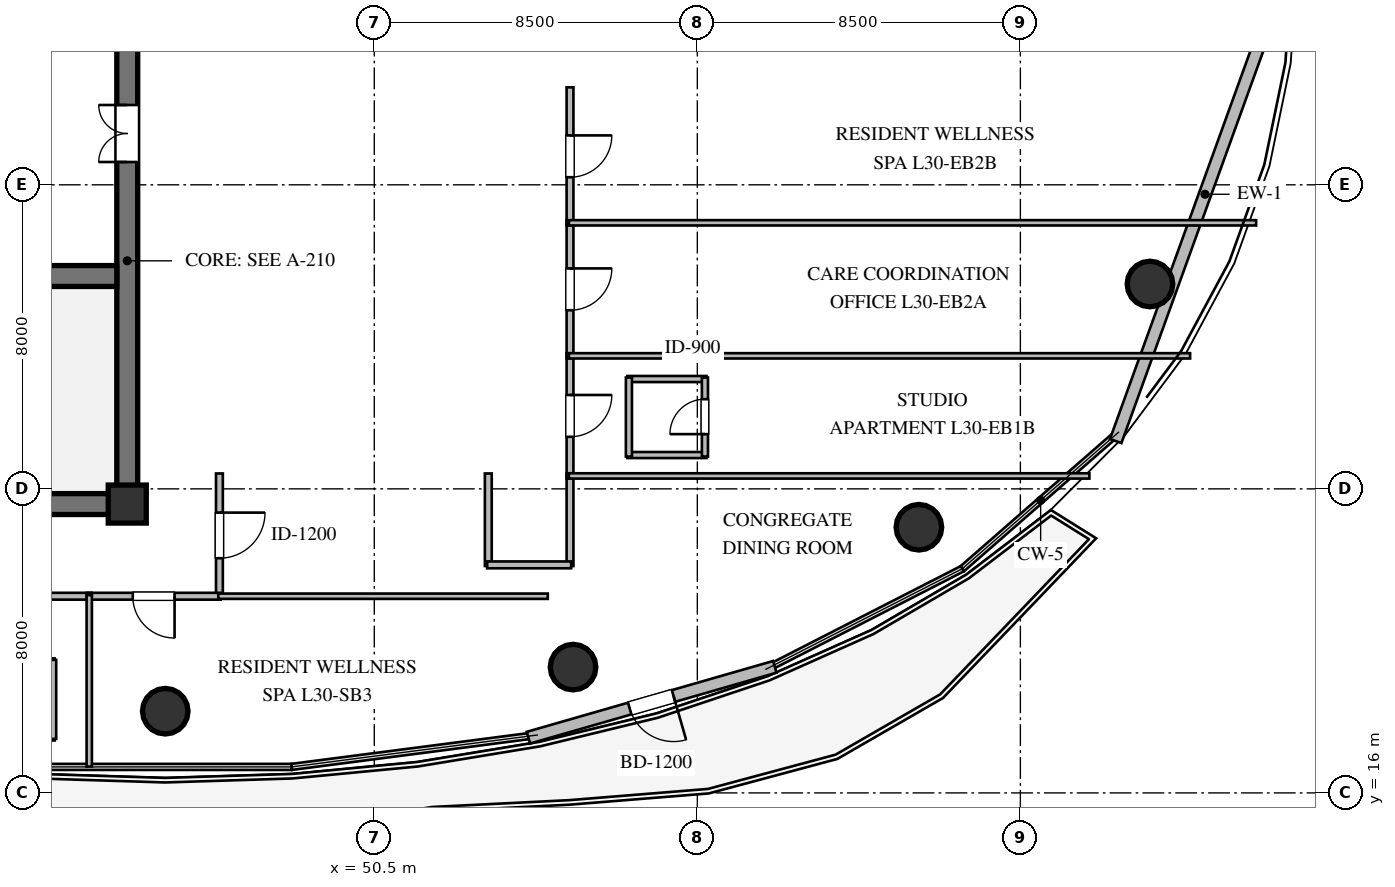
"""IFC4 building model, lengths in metres.
Left out: names, types, materials, properties, quantities, classifications, styles, units other than length and angle.
Written with IfcOpenShell. Run it as: python <this file> out.ifc"""

import sys

from ifc_helpers import new_model, si_unit, direction, frame, frame_2d, origin, origin_2d, place, context, subcontext, project, spatial, rectangle, circle, extrude, element, fill, save


model = new_model("IFC4")
c1 = context("Model", 3, precision=1e-05, world=origin(), true_north=direction((0.0, 1.0)))
c2 = subcontext(c1, "Body", "Model", "MODEL_VIEW")
j1 = project(units=[si_unit("LENGTHUNIT", "METRE"), si_unit("PLANEANGLEUNIT", "RADIAN")], contexts=[c1])
p1 = place(None, origin())
s1 = spatial("IfcSite", under=j1, at=p1, CompositionType="ELEMENT")
p2 = place(p1, origin())
s2 = spatial("IfcBuilding", under=s1, at=p2, CompositionType="ELEMENT")
p3 = place(p2, frame((0.0, 0.0, 117.0)))
s3 = spatial("IfcBuildingStorey", under=s2, at=p3, CompositionType="ELEMENT", Elevation=117.0)
p4 = place(p3, frame((21.725, 23.6, 0.0), z_axis=(0.0, 0.0, 1.0), x_axis=(1.0, 0.0, 0.0)))
e1 = element("IfcWall", 1, at=p4, inside=s3, PredefinedType="SHEAR", context=c2, shape_type="SweptSolid", body=[
    extrude(rectangle(XDim=22.55, YDim=0.55, at=frame_2d((11.275, 0.0))), origin(), (0.0, 0.0, 1.0), 3.36),
])
p5 = place(p3, frame((44.0, 23.875, 0.0), z_axis=(0.0, 0.0, 1.0), x_axis=(0.0, 1.0, 0.0)))
e2 = element("IfcWall", 2, at=p5, inside=s3, PredefinedType="SHEAR", context=c2, shape_type="SweptSolid", body=[
    extrude(rectangle(XDim=12.25, YDim=0.55, at=frame_2d((6.125, 0.0))), origin(), (0.0, 0.0, 1.0), 3.36),
])
p6 = place(p5, frame((8.725, 0.0, 0.0)))
e3 = element("IfcOpeningElement", 3, at=p6, cuts=e2, PredefinedType="OPENING", context=c2, shape_type="SweptSolid", body=[
    extrude(rectangle(XDim=1.5, YDim=2.15, at=frame_2d((0.75, 1.075))), frame((0.0, 0.285, 0.0), z_axis=(0.0, -1.0, 0.0), x_axis=(1.0, 0.0, 0.0)), (0.0, 0.0, 1.0), 0.57),
])
p7 = place(p3, frame((22.275, 29.6, 0.0), z_axis=(0.0, 0.0, 1.0), x_axis=(1.0, 0.0, 0.0)))
e4 = element("IfcWall", 4, at=p7, inside=s3, PredefinedType="SHEAR", context=c2, shape_type="SweptSolid", body=[
    extrude(rectangle(XDim=21.45, YDim=0.55, at=frame_2d((10.725, 0.0))), origin(), (0.0, 0.0, 1.0), 3.36),
])
p8 = place(p7, frame((12.175, 0.0, 0.0)))
e5 = element("IfcOpeningElement", 5, at=p8, cuts=e4, PredefinedType="OPENING", context=c2, shape_type="SweptSolid", body=[
    extrude(rectangle(XDim=1.15, YDim=2.1, at=frame_2d((0.575, 1.05))), frame((0.0, 0.285, 0.0), z_axis=(0.0, -1.0, 0.0), x_axis=(1.0, 0.0, 0.0)), (0.0, 0.0, 1.0), 0.57),
])
p9 = place(p3, frame((44.0, 23.6, 0.0), z_axis=(0.0, 0.0, 1.0), x_axis=(1.0, 0.0, 0.0)))
e6 = element("IfcColumn", 6, at=p9, inside=s3, PredefinedType="COLUMN", context=c2, shape_type="SweptSolid", body=[
    extrude(rectangle(XDim=1.0, YDim=1.0, at=origin_2d()), origin(), (0.0, 0.0, 1.0), 3.6),
])
for number, where, z_axis, x_axis in (
    (7, (45.0, 18.15, 0.0), (0.0, 0.0, 1.0), (1.0, 0.0, 0.0)),
    (8, (55.73, 19.31, 0.0), (0.0, 0.0, 1.0), (1.0, 0.0, 0.0)),
    (9, (64.83, 22.99, 0.0), (0.0, 0.0, 1.0), (1.0, 0.0, 0.0)),
    (10, (70.91, 29.39, 0.0), (0.0, 0.0, 1.0), (1.0, 0.0, 0.0)),
):
    element("IfcColumn", number, at=place(p3, frame(where, z_axis=z_axis, x_axis=x_axis)), inside=s3, PredefinedType="COLUMN", context=c2, shape_type="SweptSolid", body=[
        extrude(circle(Radius=0.6, at=origin_2d()), origin(), (0.0, 0.0, 1.0), 3.6),
    ])
p10 = place(p3, frame((74.708, 38.244, 0.0), z_axis=(0.0, 0.0, 1.0), x_axis=(-0.340324669139, -0.94030799187, 0.0)))
e11 = element("IfcWall", 11, at=p10, inside=s3, PredefinedType="STANDARD", context=c2, shape_type="SweptSolid", body=[
    extrude(rectangle(XDim=13.81, YDim=0.32, at=frame_2d((6.905, 0.0))), origin(), (0.0, 0.0, 1.0), 3.36),
])
p11 = place(p3, frame((61.039, 19.317, 0.0), z_axis=(0.0, 0.0, 1.0), x_axis=(-0.96106509915, -0.276322049784, 0.0)))
e12 = element("IfcWall", 12, at=p11, inside=s3, PredefinedType="STANDARD", context=c2, shape_type="SweptSolid", body=[
    extrude(rectangle(XDim=6.746, YDim=0.32, at=frame_2d((3.373, 0.0))), origin(), (0.0, 0.0, 1.0), 3.36),
])
p12 = place(p11, frame((2.773, 0.0, 0.0)))
e13 = element("IfcOpeningElement", 13, at=p12, cuts=e12, PredefinedType="OPENING", context=c2, shape_type="SweptSolid", body=[
    extrude(rectangle(XDim=1.2, YDim=2.15, at=frame_2d((0.6, 1.075))), frame((0.0, 0.17, 0.0), z_axis=(0.0, -1.0, 0.0), x_axis=(1.0, 0.0, 0.0)), (0.0, 0.0, 1.0), 0.34),
])
p13 = place(p3, frame((57.16, 24.89, 0.0), z_axis=(0.0, 0.0, 1.0), x_axis=(1.0, 0.0, 0.0)))
e14 = element("IfcWall", 14, at=p13, inside=s3, PredefinedType="PLUMBINGWALL", context=c2, shape_type="SweptSolid", body=[
    extrude(rectangle(XDim=2.08, YDim=0.16, at=frame_2d((1.04, 0.0))), origin(), (0.0, 0.0, 1.0), 3.36),
])
p14 = place(p3, frame((57.16, 26.89, 0.0), z_axis=(0.0, 0.0, 1.0), x_axis=(1.0, 0.0, 0.0)))
e15 = element("IfcWall", 15, at=p14, inside=s3, PredefinedType="PLUMBINGWALL", context=c2, shape_type="SweptSolid", body=[
    extrude(rectangle(XDim=2.08, YDim=0.16, at=frame_2d((1.04, 0.0))), origin(), (0.0, 0.0, 1.0), 2.806),
])
p15 = place(p3, frame((57.2, 24.85, 0.0), z_axis=(0.0, 0.0, 1.0), x_axis=(0.0, 1.0, 0.0)))
e16 = element("IfcWall", 16, at=p15, inside=s3, PredefinedType="PLUMBINGWALL", context=c2, shape_type="SweptSolid", body=[
    extrude(rectangle(XDim=2.08, YDim=0.16, at=frame_2d((1.04, 0.0))), origin(), (0.0, 0.0, 1.0), 3.36),
])
p16 = place(p3, frame((59.2, 24.85, 0.0), z_axis=(0.0, 0.0, 1.0), x_axis=(0.0, 1.0, 0.0)))
e17 = element("IfcWall", 17, at=p16, inside=s3, PredefinedType="PLUMBINGWALL", context=c2, shape_type="SweptSolid", body=[
    extrude(rectangle(XDim=2.08, YDim=0.16, at=frame_2d((1.04, 0.0))), origin(), (0.0, 0.0, 1.0), 2.996),
])
p17 = place(p16, frame((0.59, 0.0, 0.0)))
e18 = element("IfcOpeningElement", 18, at=p17, cuts=e17, PredefinedType="OPENING", context=c2, shape_type="SweptSolid", body=[
    extrude(rectangle(XDim=0.92, YDim=2.1, at=frame_2d((0.46, 1.05))), frame((0.0, 0.09, 0.0), z_axis=(0.0, -1.0, 0.0), x_axis=(1.0, 0.0, 0.0)), (0.0, 0.0, 1.0), 0.18),
])
for number, where, z_axis, x_axis in (
    (19, (40.01, 17.46, 0.0), (0.0, 0.0, 1.0), (1.0, 0.0, 0.0)),
    (20, (40.01, 19.46, 0.0), (0.0, 0.0, 1.0), (1.0, 0.0, 0.0)),
    (21, (42.05, 17.42, 0.0), (0.0, 0.0, 1.0), (0.0, 1.0, 0.0)),
):
    element("IfcWall", number, at=place(p3, frame(where, z_axis=z_axis, x_axis=x_axis)), inside=s3, PredefinedType="PLUMBINGWALL", context=c2, shape_type="SweptSolid", body=[
        extrude(rectangle(XDim=2.08, YDim=0.16, at=frame_2d((1.04, 0.0))), origin(), (0.0, 0.0, 1.0), 3.36),
    ])
p18 = place(p3, frame((46.425, 24.405, 0.0), z_axis=(0.0, 0.0, 1.0), x_axis=(0.0, -1.0, 0.0)))
e22 = element("IfcWall", 22, at=p18, inside=s3, PredefinedType="PARTITIONING", context=c2, shape_type="SweptSolid", body=[
    extrude(rectangle(XDim=3.26, YDim=0.18, at=frame_2d((1.63, 0.0))), origin(), (0.0, 0.0, 1.0), 3.36),
])
p19 = place(p18, frame((1.03, 0.0, 0.0)))
e23 = element("IfcOpeningElement", 23, at=p19, cuts=e22, PredefinedType="OPENING", context=c2, shape_type="SweptSolid", body=[
    extrude(rectangle(XDim=1.2, YDim=2.15, at=frame_2d((0.6, 1.075))), frame((0.0, 0.1, 0.0), z_axis=(0.0, -1.0, 0.0), x_axis=(1.0, 0.0, 0.0)), (0.0, 0.0, 1.0), 0.2),
])
for number, where, z_axis, x_axis in (
    (24, (55.65, 24.405, 0.0), (0.0, 0.0, 1.0), (0.0, -1.0, 0.0)),
    (25, (53.5, 21.97, 0.0), (0.0, 0.0, 1.0), (0.0, 1.0, 0.0)),
):
    element("IfcWall", number, at=place(p3, frame(where, z_axis=z_axis, x_axis=x_axis)), inside=s3, PredefinedType="PARTITIONING", context=c2, shape_type="SweptSolid", body=[
        extrude(rectangle(XDim=2.435, YDim=0.18, at=frame_2d((1.218, 0.0))), origin(), (0.0, 0.0, 1.0), 3.36),
    ])
p20 = place(p3, frame((55.68, 22.0, 0.0), z_axis=(0.0, 0.0, 1.0), x_axis=(-1.0, 0.0, 0.0)))
e26 = element("IfcWall", 26, at=p20, inside=s3, PredefinedType="PARTITIONING", context=c2, shape_type="SweptSolid", body=[
    extrude(rectangle(XDim=2.21, YDim=0.18, at=frame_2d((1.105, 0.0))), origin(), (0.0, 0.0, 1.0), 3.36),
])
p21 = place(p3, frame((55.65, 27.565, 0.0), z_axis=(0.0, 0.0, 1.0), x_axis=(0.0, -1.0, 0.0)))
e27 = element("IfcWall", 27, at=p21, inside=s3, PredefinedType="PARTITIONING", context=c2, shape_type="SweptSolid", body=[
    extrude(rectangle(XDim=3.29, YDim=0.18, at=frame_2d((1.645, 0.0))), origin(), (0.0, 0.0, 1.0), 3.36),
])
p22 = place(p21, frame((1.095, 0.0, 0.0)))
e28 = element("IfcOpeningElement", 28, at=p22, cuts=e27, PredefinedType="OPENING", context=c2, shape_type="SweptSolid", body=[
    extrude(rectangle(XDim=1.1, YDim=2.1, at=frame_2d((0.55, 1.05))), frame((0.0, 0.1, 0.0), z_axis=(0.0, -1.0, 0.0), x_axis=(1.0, 0.0, 0.0)), (0.0, 0.0, 1.0), 0.2),
])
p23 = place(p3, frame((55.65, 31.065, 0.0), z_axis=(0.0, 0.0, 1.0), x_axis=(0.0, -1.0, 0.0)))
e29 = element("IfcWall", 29, at=p23, inside=s3, PredefinedType="PARTITIONING", context=c2, shape_type="SweptSolid", body=[
    extrude(rectangle(XDim=3.63, YDim=0.18, at=frame_2d((1.815, 0.0))), origin(), (0.0, 0.0, 1.0), 3.36),
])
p24 = place(p23, frame((1.265, 0.0, 0.0)))
e30 = element("IfcOpeningElement", 30, at=p24, cuts=e29, PredefinedType="OPENING", context=c2, shape_type="SweptSolid", body=[
    extrude(rectangle(XDim=1.1, YDim=2.1, at=frame_2d((0.55, 1.05))), frame((0.0, 0.1, 0.0), z_axis=(0.0, -1.0, 0.0), x_axis=(1.0, 0.0, 0.0)), (0.0, 0.0, 1.0), 0.2),
])
p25 = place(p3, frame((55.65, 34.565, 0.0), z_axis=(0.0, 0.0, 1.0), x_axis=(0.0, -1.0, 0.0)))
e31 = element("IfcWall", 31, at=p25, inside=s3, PredefinedType="PARTITIONING", context=c2, shape_type="SweptSolid", body=[
    extrude(rectangle(XDim=3.63, YDim=0.18, at=frame_2d((1.815, 0.0))), origin(), (0.0, 0.0, 1.0), 3.36),
])
p26 = place(p25, frame((1.265, 0.0, 0.0)))
e32 = element("IfcOpeningElement", 32, at=p26, cuts=e31, PredefinedType="OPENING", context=c2, shape_type="SweptSolid", body=[
    extrude(rectangle(XDim=1.1, YDim=2.1, at=frame_2d((0.55, 1.05))), frame((0.0, 0.1, 0.0), z_axis=(0.0, -1.0, 0.0), x_axis=(1.0, 0.0, 0.0)), (0.0, 0.0, 1.0), 0.2),
])
p27 = place(p3, frame((43.065, 21.175, 0.0), z_axis=(0.0, 0.0, 1.0), x_axis=(-1.0, 0.0, 0.0)))
e33 = element("IfcWall", 33, at=p27, inside=s3, PredefinedType="PARTITIONING", context=c2, shape_type="SweptSolid", body=[
    extrude(rectangle(XDim=17.614, YDim=0.18, at=frame_2d((8.807, 0.0))), origin(), (0.0, 0.0, 1.0), 2.657),
])
p28 = place(p27, frame((6.515, 0.0, 0.0)))
e34 = element("IfcOpeningElement", 34, at=p28, cuts=e33, PredefinedType="OPENING", context=c2, shape_type="SweptSolid", body=[
    extrude(rectangle(XDim=1.1, YDim=2.1, at=frame_2d((0.55, 1.05))), frame((0.0, 0.1, 0.0), z_axis=(0.0, -1.0, 0.0), x_axis=(1.0, 0.0, 0.0)), (0.0, 0.0, 1.0), 0.2),
])
p29 = place(p3, frame((46.455, 21.175, 0.0), z_axis=(0.0, 0.0, 1.0), x_axis=(-1.0, 0.0, 0.0)))
e35 = element("IfcWall", 35, at=p29, inside=s3, PredefinedType="PARTITIONING", context=c2, shape_type="SweptSolid", body=[
    extrude(rectangle(XDim=3.52, YDim=0.18, at=frame_2d((1.76, 0.0))), origin(), (0.0, 0.0, 1.0), 2.996),
])
p30 = place(p29, frame((1.21, 0.0, 0.0)))
e36 = element("IfcOpeningElement", 36, at=p30, cuts=e35, PredefinedType="OPENING", context=c2, shape_type="SweptSolid", body=[
    extrude(rectangle(XDim=1.1, YDim=2.1, at=frame_2d((0.55, 1.05))), frame((0.0, 0.1, 0.0), z_axis=(0.0, -1.0, 0.0), x_axis=(1.0, 0.0, 0.0)), (0.0, 0.0, 1.0), 0.2),
])
p31 = place(p3, frame((55.62, 24.34, 0.0), z_axis=(0.0, 0.0, 1.0), x_axis=(1.0, 0.0, 0.0)))
e37 = element("IfcWall", 37, at=p31, inside=s3, PredefinedType="PARTITIONING", context=c2, shape_type="SweptSolid", body=[
    extrude(rectangle(XDim=13.696, YDim=0.14, at=frame_2d((6.848, 0.0))), origin(), (0.0, 0.0, 1.0), 3.36),
])
p32 = place(p3, frame((55.065, 21.175, 0.0), z_axis=(0.0, 0.0, 1.0), x_axis=(-1.0, 0.0, 0.0)))
e38 = element("IfcWall", 38, at=p32, inside=s3, PredefinedType="PARTITIONING", context=c2, shape_type="SweptSolid", body=[
    extrude(rectangle(XDim=8.67, YDim=0.14, at=frame_2d((4.335, 0.0))), origin(), (0.0, 0.0, 1.0), 2.996),
])
p33 = place(p3, frame((55.62, 27.5, 0.0), z_axis=(0.0, 0.0, 1.0), x_axis=(1.0, 0.0, 0.0)))
e39 = element("IfcWall", 39, at=p33, inside=s3, PredefinedType="PARTITIONING", context=c2, shape_type="SweptSolid", body=[
    extrude(rectangle(XDim=16.346, YDim=0.14, at=frame_2d((8.173, 0.0))), origin(), (0.0, 0.0, 1.0), 2.806),
])
p34 = place(p3, frame((55.62, 31.0, 0.0), z_axis=(0.0, 0.0, 1.0), x_axis=(1.0, 0.0, 0.0)))
e40 = element("IfcWall", 40, at=p34, inside=s3, PredefinedType="PARTITIONING", context=c2, shape_type="SweptSolid", body=[
    extrude(rectangle(XDim=18.083, YDim=0.14, at=frame_2d((9.042, 0.0))), origin(), (0.0, 0.0, 1.0), 3.36),
])
p35 = place(p3, frame((43.0, 21.205, 0.0), z_axis=(0.0, 0.0, 1.0), x_axis=(0.0, -1.0, 0.0)))
e41 = element("IfcWall", 41, at=p35, inside=s3, PredefinedType="PARTITIONING", context=c2, shape_type="SweptSolid", body=[
    extrude(rectangle(XDim=4.511, YDim=0.14, at=frame_2d((2.255, 0.0))), origin(), (0.0, 0.0, 1.0), 3.36),
])
p36 = place(p12, origin())
e42 = element("IfcDoor", 42, at=p36, inside=s3, OperationType="SINGLE_SWING_LEFT", PredefinedType="DOOR", context=c2, shape_type="SweptSolid", body=[
    extrude(rectangle(XDim=1.2, YDim=2.15, at=frame_2d((0.6, 1.075))), frame((0.0, 0.025, 0.0), z_axis=(0.0, -1.0, 0.0), x_axis=(1.0, 0.0, 0.0)), (0.0, 0.0, 1.0), 0.05),
])
fill(e13, e42)
p37 = place(p6, origin())
e43 = element("IfcDoor", 43, at=p37, inside=s3, OperationType="DOUBLE_DOOR_SINGLE_SWING", PredefinedType="DOOR", context=c2, shape_type="SweptSolid", body=[
    extrude(rectangle(XDim=1.5, YDim=2.15, at=frame_2d((0.75, 1.075))), frame((0.0, 0.025, 0.0), z_axis=(0.0, -1.0, 0.0), x_axis=(1.0, 0.0, 0.0)), (0.0, 0.0, 1.0), 0.05),
])
fill(e3, e43)
p38 = place(p17, origin())
e44 = element("IfcDoor", 44, at=p38, inside=s3, OperationType="SINGLE_SWING_LEFT", PredefinedType="DOOR", context=c2, shape_type="SweptSolid", body=[
    extrude(rectangle(XDim=0.92, YDim=2.1, at=frame_2d((0.46, 1.05))), frame((0.0, 0.025, 0.0), z_axis=(0.0, -1.0, 0.0), x_axis=(1.0, 0.0, 0.0)), (0.0, 0.0, 1.0), 0.05),
])
fill(e18, e44)
p39 = place(p19, origin())
e45 = element("IfcDoor", 45, at=p39, inside=s3, OperationType="SINGLE_SWING_LEFT", PredefinedType="DOOR", context=c2, shape_type="SweptSolid", body=[
    extrude(rectangle(XDim=1.2, YDim=2.15, at=frame_2d((0.6, 1.075))), frame((0.0, 0.025, 0.0), z_axis=(0.0, -1.0, 0.0), x_axis=(1.0, 0.0, 0.0)), (0.0, 0.0, 1.0), 0.05),
])
fill(e23, e45)
p40 = place(p22, origin())
e46 = element("IfcDoor", 46, at=p40, inside=s3, OperationType="SINGLE_SWING_LEFT", PredefinedType="DOOR", context=c2, shape_type="SweptSolid", body=[
    extrude(rectangle(XDim=1.1, YDim=2.1, at=frame_2d((0.55, 1.05))), frame((0.0, 0.025, 0.0), z_axis=(0.0, -1.0, 0.0), x_axis=(1.0, 0.0, 0.0)), (0.0, 0.0, 1.0), 0.05),
])
fill(e28, e46)
p41 = place(p24, origin())
e47 = element("IfcDoor", 47, at=p41, inside=s3, OperationType="SINGLE_SWING_LEFT", PredefinedType="DOOR", context=c2, shape_type="SweptSolid", body=[
    extrude(rectangle(XDim=1.1, YDim=2.1, at=frame_2d((0.55, 1.05))), frame((0.0, 0.025, 0.0), z_axis=(0.0, -1.0, 0.0), x_axis=(1.0, 0.0, 0.0)), (0.0, 0.0, 1.0), 0.05),
])
fill(e30, e47)
p42 = place(p26, origin())
e48 = element("IfcDoor", 48, at=p42, inside=s3, OperationType="SINGLE_SWING_LEFT", PredefinedType="DOOR", context=c2, shape_type="SweptSolid", body=[
    extrude(rectangle(XDim=1.1, YDim=2.1, at=frame_2d((0.55, 1.05))), frame((0.0, 0.025, 0.0), z_axis=(0.0, -1.0, 0.0), x_axis=(1.0, 0.0, 0.0)), (0.0, 0.0, 1.0), 0.05),
])
fill(e32, e48)
p43 = place(p30, origin())
e49 = element("IfcDoor", 49, at=p43, inside=s3, OperationType="SINGLE_SWING_LEFT", PredefinedType="DOOR", context=c2, shape_type="SweptSolid", body=[
    extrude(rectangle(XDim=1.1, YDim=2.1, at=frame_2d((0.55, 1.05))), frame((0.0, 0.025, 0.0), z_axis=(0.0, -1.0, 0.0), x_axis=(1.0, 0.0, 0.0)), (0.0, 0.0, 1.0), 0.05),
])
fill(e36, e49)
save(model, sys.argv[1])
